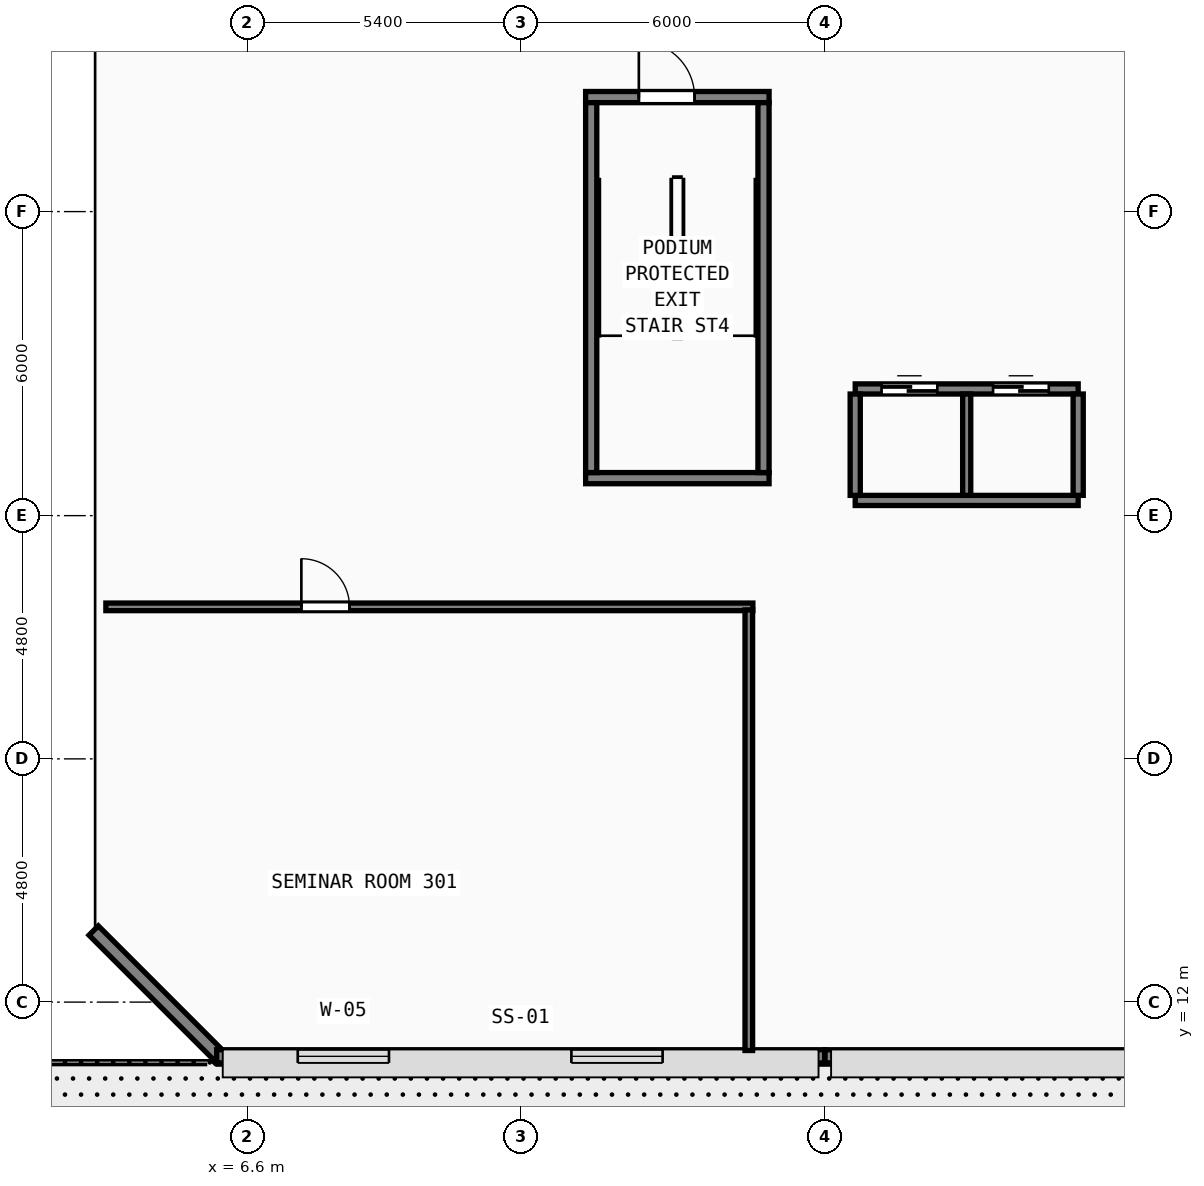
"""IFC4 building model, lengths in metres.
Left out: names, types, materials, properties, quantities, classifications, styles, units other than length and angle.
Written with IfcOpenShell. Run it as: python <this file> out.ifc"""

import sys

from ifc_helpers import new_model, si_unit, direction, frame, frame_2d, origin, origin_2d, place, context, subcontext, project, spatial, rectangle, hollow_rectangle, i_section, extrude, element, fill, save


model = new_model("IFC4")
c1 = context("Model", 3, precision=1e-05, world=origin(), true_north=direction((0.0, 1.0)))
c2 = subcontext(c1, "Body", "Model", "MODEL_VIEW")
j1 = project(units=[si_unit("LENGTHUNIT", "METRE"), si_unit("PLANEANGLEUNIT", "RADIAN")], contexts=[c1])
p1 = place(None, origin())
s1 = spatial("IfcSite", under=j1, at=p1, CompositionType="ELEMENT")
p2 = place(p1, origin())
s2 = spatial("IfcBuilding", under=s1, at=p2, CompositionType="ELEMENT")
p3 = place(p2, frame((0.0, 0.0, 15.6)))
s3 = spatial("IfcBuildingStorey", under=s2, at=p3, CompositionType="ELEMENT", Elevation=15.6)
p4 = place(p3, frame((13.28, 29.86, 0.0), z_axis=(0.0, 0.0, 1.0), x_axis=(1.0, 0.0, 0.0)))
e1 = element("IfcWall", 1, at=p4, inside=s3, PredefinedType="SHEAR", context=c2, shape_type="SweptSolid", body=[
    extrude(rectangle(XDim=3.62, YDim=0.22, at=frame_2d((1.81, 0.0))), origin(), (0.0, 0.0, 1.0), 3.78),
])
p5 = place(p4, frame((1.05, 0.0, 0.0)))
e2 = element("IfcOpeningElement", 2, at=p5, cuts=e1, PredefinedType="OPENING", context=c2, shape_type="SweptSolid", body=[
    extrude(rectangle(XDim=1.1, YDim=2.15, at=frame_2d((0.55, 1.075))), frame((0.0, 0.12, 0.0), z_axis=(0.0, -1.0, 0.0), x_axis=(1.0, 0.0, 0.0)), (0.0, 0.0, 1.0), 0.24),
])
p6 = place(p3, frame((13.28, 22.34, 0.0), z_axis=(0.0, 0.0, 1.0), x_axis=(1.0, 0.0, 0.0)))
e3 = element("IfcWall", 3, at=p6, inside=s3, PredefinedType="SHEAR", context=c2, shape_type="SweptSolid", body=[
    extrude(rectangle(XDim=3.62, YDim=0.22, at=frame_2d((1.81, 0.0))), origin(), (0.0, 0.0, 1.0), 3.78),
])
for number, where, z_axis, x_axis in (
    (4, (13.39, 22.45, 0.0), (0.0, 0.0, 1.0), (0.0, 1.0, 0.0)),
    (5, (16.79, 22.45, 0.0), (0.0, 0.0, 1.0), (0.0, 1.0, 0.0)),
):
    element("IfcWall", number, at=place(p3, frame(where, z_axis=z_axis, x_axis=x_axis)), inside=s3, PredefinedType="SHEAR", context=c2, shape_type="SweptSolid", body=[
        extrude(rectangle(XDim=7.3, YDim=0.22, at=frame_2d((3.65, 0.0))), origin(), (0.0, 0.0, 1.0), 3.78),
    ])
for number, where, z_axis, x_axis in (
    (6, (24.0, 21.6, 0.0), (0.0, 0.0, 1.0), (1.0, 0.0, 0.0)),
    (7, (12.6, 16.8, 0.0), (0.0, 0.0, 1.0), (1.0, 0.0, 0.0)),
    (8, (12.6, 27.6, 0.0), (0.0, 0.0, 1.0), (1.0, 0.0, 0.0)),
):
    element("IfcColumn", number, at=place(p3, frame(where, z_axis=z_axis, x_axis=x_axis)), inside=s3, PredefinedType="COLUMN", context=c2, shape_type="SweptSolid", body=[
        extrude(hollow_rectangle(XDim=1.3, YDim=1.3, WallThickness=0.048, at=origin_2d()), origin(), (0.0, 0.0, 1.0), 4.2),
    ])
for number, where, z_axis, x_axis in (
    (9, (6.0, 17.4, 0.0), (0.0, 0.0, 1.0), (1.0, 0.0, 0.0)),
    (10, (6.0, 27.6, 0.0), (0.0, 0.0, 1.0), (1.0, 0.0, 0.0)),
):
    element("IfcColumn", number, at=place(p3, frame(where, z_axis=z_axis, x_axis=x_axis)), inside=s3, PredefinedType="COLUMN", context=c2, shape_type="SweptSolid", body=[
        extrude(hollow_rectangle(XDim=1.15, YDim=1.15, WallThickness=0.042, at=origin_2d()), origin(), (0.0, 0.0, 1.0), 4.2),
    ])
for number, where, z_axis, x_axis in (
    (11, (18.0, 11.0, 0.0), (0.0, 0.0, 1.0), (1.0, 0.0, 0.0)),
    (12, (18.0, 13.2, 0.0), (0.0, 0.0, 1.0), (1.0, 0.0, 0.0)),
    (13, (18.0, 16.8, 0.0), (0.0, 0.0, 1.0), (1.0, 0.0, 0.0)),
):
    element("IfcColumn", number, at=place(p3, frame(where, z_axis=z_axis, x_axis=x_axis)), inside=s3, PredefinedType="COLUMN", context=c2, shape_type="SweptSolid", body=[
        extrude(i_section(OverallWidth=0.3, OverallDepth=0.3, WebThickness=0.01, FlangeThickness=0.015, FilletRadius=0.018, at=origin_2d()), origin(), (0.0, 0.0, 1.0), 4.2),
    ])
p7 = place(p3, frame((3.571, 13.413, 0.0), z_axis=(0.0, 0.0, 1.0), x_axis=(0.7071410079, -0.707072552817, 0.0)))
e14 = element("IfcWall", 14, at=p7, inside=s3, PredefinedType="SOLIDWALL", context=c2, shape_type="SweptSolid", body=[
    extrude(rectangle(XDim=3.566, YDim=0.26, at=frame_2d((1.783, 0.0))), origin(), (0.0, 0.0, 1.0), 3.78),
])
p8 = place(p3, frame((5.999, 10.93, 0.0), z_axis=(0.0, 0.0, 1.0), x_axis=(1.0, 0.0, 0.0)))
e15 = element("IfcWall", 15, at=p8, inside=s3, PredefinedType="SOLIDWALL", context=c2, shape_type="SweptSolid", body=[
    extrude(rectangle(XDim=11.997, YDim=0.26, at=frame_2d((5.999, 0.0))), origin(), (0.0, 0.0, 1.0), 3.78),
])
p9 = place(p8, frame((1.6, 0.0, 0.85)))
e16 = element("IfcOpeningElement", 16, at=p9, cuts=e15, PredefinedType="OPENING", context=c2, shape_type="SweptSolid", body=[
    extrude(rectangle(XDim=1.8, YDim=2.2, at=frame_2d((0.9, 1.1))), frame((0.0, 0.14, 0.0), z_axis=(0.0, -1.0, 0.0), x_axis=(1.0, 0.0, 0.0)), (0.0, 0.0, 1.0), 0.28),
])
p10 = place(p8, frame((7.0, 0.0, 0.85)))
e17 = element("IfcOpeningElement", 17, at=p10, cuts=e15, PredefinedType="OPENING", context=c2, shape_type="SweptSolid", body=[
    extrude(rectangle(XDim=1.8, YDim=2.2, at=frame_2d((0.9, 1.1))), frame((0.0, 0.14, 0.0), z_axis=(0.0, -1.0, 0.0), x_axis=(1.0, 0.0, 0.0)), (0.0, 0.0, 1.0), 0.28),
])
p11 = place(p3, frame((18.004, 10.93, 0.0), z_axis=(0.0, 0.0, 1.0), x_axis=(1.0, 0.0, 0.0)))
e18 = element("IfcWall", 18, at=p11, inside=s3, PredefinedType="SOLIDWALL", context=c2, shape_type="SweptSolid", body=[
    extrude(rectangle(XDim=40.792, YDim=0.26, at=frame_2d((20.396, 0.0))), origin(), (0.0, 0.0, 1.0), 3.177),
])
p12 = place(p3, frame((18.6, 24.1, 0.0), z_axis=(0.0, 0.0, 1.0), x_axis=(1.0, 0.0, 0.0)))
e19 = element("IfcWall", 19, at=p12, inside=s3, PredefinedType="SOLIDWALL", context=c2, shape_type="SweptSolid", body=[
    extrude(rectangle(XDim=4.4, YDim=0.2, at=frame_2d((2.2, 0.0))), origin(), (0.0, 0.0, 1.0), 3.78),
])
p13 = place(p12, frame((0.52, 0.0, 0.0)))
e20 = element("IfcOpeningElement", 20, at=p13, cuts=e19, PredefinedType="OPENING", context=c2, shape_type="SweptSolid", body=[
    extrude(rectangle(XDim=1.1, YDim=2.2, at=frame_2d((0.55, 1.1))), frame((0.0, 0.11, 0.0), z_axis=(0.0, -1.0, 0.0), x_axis=(1.0, 0.0, 0.0)), (0.0, 0.0, 1.0), 0.22),
])
p14 = place(p12, frame((2.72, 0.0, 0.0)))
e21 = element("IfcOpeningElement", 21, at=p14, cuts=e19, PredefinedType="OPENING", context=c2, shape_type="SweptSolid", body=[
    extrude(rectangle(XDim=1.1, YDim=2.2, at=frame_2d((0.55, 1.1))), frame((0.0, 0.11, 0.0), z_axis=(0.0, -1.0, 0.0), x_axis=(1.0, 0.0, 0.0)), (0.0, 0.0, 1.0), 0.22),
])
p15 = place(p3, frame((18.6, 21.9, 0.0), z_axis=(0.0, 0.0, 1.0), x_axis=(1.0, 0.0, 0.0)))
e22 = element("IfcWall", 22, at=p15, inside=s3, PredefinedType="SOLIDWALL", context=c2, shape_type="SweptSolid", body=[
    extrude(rectangle(XDim=4.4, YDim=0.2, at=frame_2d((2.2, 0.0))), origin(), (0.0, 0.0, 1.0), 3.78),
])
for number, where, z_axis, x_axis in (
    (23, (18.6, 22.0, 0.0), (0.0, 0.0, 1.0), (0.0, 1.0, 0.0)),
    (24, (23.0, 22.0, 0.0), (0.0, 0.0, 1.0), (0.0, 1.0, 0.0)),
):
    element("IfcWall", number, at=place(p3, frame(where, z_axis=z_axis, x_axis=x_axis)), inside=s3, PredefinedType="SOLIDWALL", context=c2, shape_type="SweptSolid", body=[
        extrude(rectangle(XDim=2.0, YDim=0.2, at=frame_2d((1.0, 0.0))), origin(), (0.0, 0.0, 1.0), 3.78),
    ])
p16 = place(p3, frame((20.8, 22.0, 0.0), z_axis=(0.0, 0.0, 1.0), x_axis=(0.0, 1.0, 0.0)))
e25 = element("IfcWall", 25, at=p16, inside=s3, PredefinedType="SOLIDWALL", context=c2, shape_type="SweptSolid", body=[
    extrude(rectangle(XDim=2.0, YDim=0.16, at=frame_2d((1.0, 0.0))), origin(), (0.0, 0.0, 1.0), 3.78),
])
p17 = place(p3, frame((3.812, 19.8, 0.0), z_axis=(0.0, 0.0, 1.0), x_axis=(1.0, 0.0, 0.0)))
e26 = element("IfcWall", 26, at=p17, inside=s3, PredefinedType="PARTITIONING", context=c2, shape_type="SweptSolid", body=[
    extrude(rectangle(XDim=12.768, YDim=0.15, at=frame_2d((6.384, 0.0))), origin(), (0.0, 0.0, 1.0), 3.78),
])
p18 = place(p17, frame((4.808, 0.0, 0.0), z_axis=(0.0, 0.0, 1.0), x_axis=(-1.0, 0.0, 0.0)))
e27 = element("IfcOpeningElement", 27, at=p18, cuts=e26, PredefinedType="OPENING", context=c2, shape_type="SweptSolid", body=[
    extrude(rectangle(XDim=0.95, YDim=2.12, at=frame_2d((0.475, 1.06))), frame((0.0, 0.085, 0.0), z_axis=(0.0, -1.0, 0.0), x_axis=(1.0, 0.0, 0.0)), (0.0, 0.0, 1.0), 0.17),
])
p19 = place(p3, frame((16.5, 11.045, 0.0), z_axis=(0.0, 0.0, 1.0), x_axis=(0.0, 1.0, 0.0)))
e28 = element("IfcWall", 28, at=p19, inside=s3, PredefinedType="PARTITIONING", context=c2, shape_type="SweptSolid", body=[
    extrude(rectangle(XDim=8.695, YDim=0.15, at=frame_2d((4.348, 0.0))), origin(), (0.0, 0.0, 1.0), 3.78),
])
p20 = place(p9, origin())
e29 = element("IfcWindow", 29, at=p20, inside=s3, PartitioningType="SINGLE_PANEL", PredefinedType="WINDOW", context=c2, shape_type="SweptSolid", body=[
    extrude(rectangle(XDim=1.8, YDim=2.2, at=frame_2d((0.9, 1.1))), frame((0.0, 0.03, 0.0), z_axis=(0.0, -1.0, 0.0), x_axis=(1.0, 0.0, 0.0)), (0.0, 0.0, 1.0), 0.06),
])
fill(e16, e29)
p21 = place(p10, origin())
e30 = element("IfcWindow", 30, at=p21, inside=s3, PartitioningType="SINGLE_PANEL", PredefinedType="WINDOW", context=c2, shape_type="SweptSolid", body=[
    extrude(rectangle(XDim=1.8, YDim=2.2, at=frame_2d((0.9, 1.1))), frame((0.0, 0.03, 0.0), z_axis=(0.0, -1.0, 0.0), x_axis=(1.0, 0.0, 0.0)), (0.0, 0.0, 1.0), 0.06),
])
fill(e17, e30)
p22 = place(p5, origin())
e31 = element("IfcDoor", 31, at=p22, inside=s3, OperationType="SINGLE_SWING_LEFT", PredefinedType="DOOR", context=c2, shape_type="SweptSolid", body=[
    extrude(rectangle(XDim=1.1, YDim=2.15, at=frame_2d((0.55, 1.075))), frame((0.0, 0.025, 0.0), z_axis=(0.0, -1.0, 0.0), x_axis=(1.0, 0.0, 0.0)), (0.0, 0.0, 1.0), 0.05),
])
fill(e2, e31)
p23 = place(p13, origin())
e32 = element("IfcDoor", 32, at=p23, inside=s3, OperationType="SLIDING_TO_LEFT", PredefinedType="DOOR", context=c2, shape_type="SweptSolid", body=[
    extrude(rectangle(XDim=1.1, YDim=2.2, at=frame_2d((0.55, 1.1))), frame((0.0, 0.025, 0.0), z_axis=(0.0, -1.0, 0.0), x_axis=(1.0, 0.0, 0.0)), (0.0, 0.0, 1.0), 0.05),
])
fill(e20, e32)
p24 = place(p14, origin())
e33 = element("IfcDoor", 33, at=p24, inside=s3, OperationType="SLIDING_TO_LEFT", PredefinedType="DOOR", context=c2, shape_type="SweptSolid", body=[
    extrude(rectangle(XDim=1.1, YDim=2.2, at=frame_2d((0.55, 1.1))), frame((0.0, 0.025, 0.0), z_axis=(0.0, -1.0, 0.0), x_axis=(1.0, 0.0, 0.0)), (0.0, 0.0, 1.0), 0.05),
])
fill(e21, e33)
p25 = place(p18, origin())
e34 = element("IfcDoor", 34, at=p25, inside=s3, OperationType="SINGLE_SWING_RIGHT", PredefinedType="DOOR", context=c2, shape_type="SweptSolid", body=[
    extrude(rectangle(XDim=0.95, YDim=2.12, at=frame_2d((0.475, 1.06))), frame((0.0, 0.025, 0.0), z_axis=(0.0, -1.0, 0.0), x_axis=(1.0, 0.0, 0.0)), (0.0, 0.0, 1.0), 0.05),
])
fill(e27, e34)
save(model, sys.argv[1])
